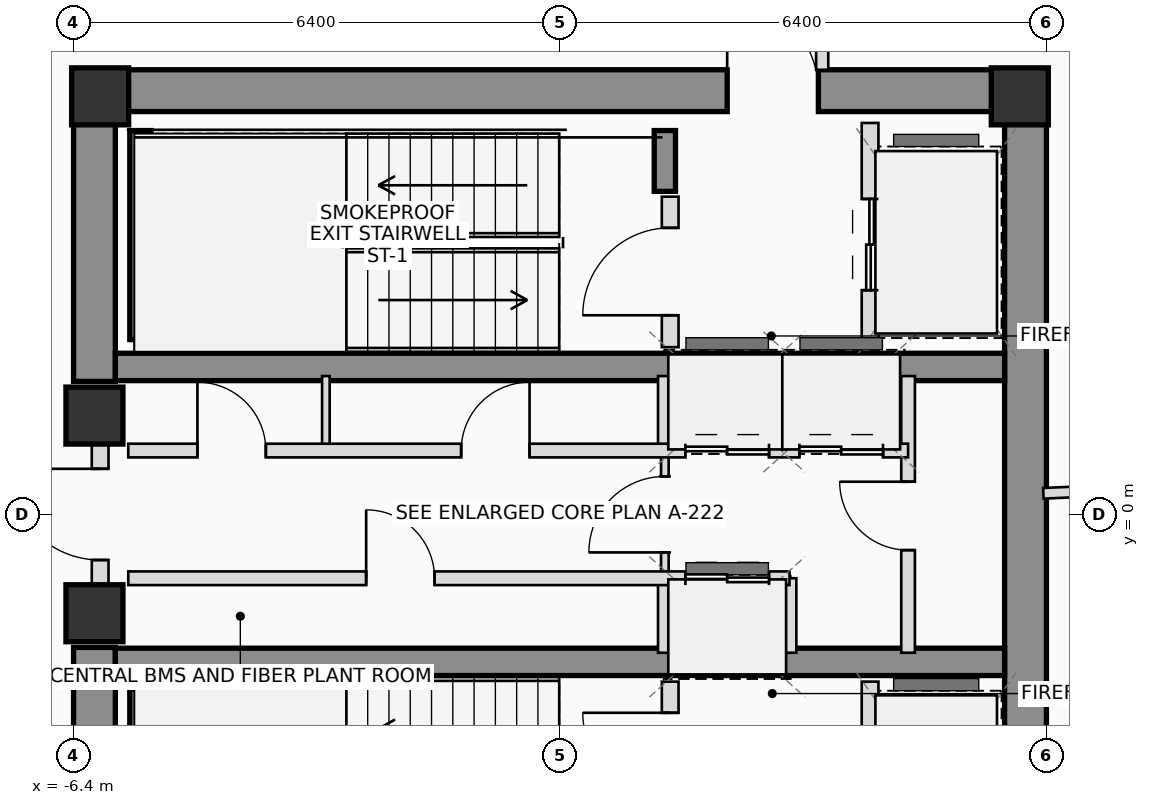
"""IFC4 building model, lengths in metres.
Left out: names, types, materials, properties, quantities, classifications, styles, units other than length and angle.
Written with IfcOpenShell. Run it as: python <this file> out.ifc"""

import sys

from ifc_helpers import new_model, si_unit, direction, frame, frame_2d, origin, origin_2d, place, context, subcontext, project, spatial, rectangle, extrude, source, transform, mapped, element, fill, save


model = new_model("IFC4")
c1 = context("Model", 3, precision=1e-05, world=origin(), true_north=direction((0.0, 1.0)))
c2 = subcontext(c1, "Body", "Model", "MODEL_VIEW")
j1 = project(units=[si_unit("LENGTHUNIT", "METRE"), si_unit("PLANEANGLEUNIT", "RADIAN")], contexts=[c1])
p1 = place(None, origin())
s1 = spatial("IfcSite", under=j1, at=p1, CompositionType="ELEMENT")
p2 = place(p1, origin())
s2 = spatial("IfcBuilding", under=s1, at=p2, CompositionType="ELEMENT")
p3 = place(p2, frame((0.0, 0.0, 238.85)))
s3 = spatial("IfcBuildingStorey", under=s2, at=p3, CompositionType="ELEMENT", Elevation=238.85)
m1 = source(origin(), c2, "Body", "SweptSolid", [
    extrude(rectangle(XDim=0.75, YDim=0.75, at=origin_2d()), origin(), (0.0, 0.0, 1.0), 3.4),
])
for number, where, z_axis, x_axis in (
    (1, (6.05, 5.5, 0.0), (0.0, 0.0, 1.0), (1.0, 0.0, 0.0)),
    (2, (-6.05, 5.5, 0.0), (0.0, 0.0, 1.0), (1.0, 0.0, 0.0)),
):
    element("IfcColumn", number, at=place(p3, frame(where, z_axis=z_axis, x_axis=x_axis)), inside=s3, PredefinedType="COLUMN", context=c2, shape_type="MappedRepresentation", body=[
        mapped(m1, transform((0.0, 0.0, 0.0), scale=1.0)),
    ])
p4 = place(p3, frame((-6.4, 5.575, 0.0), z_axis=(0.0, 0.0, 1.0), x_axis=(1.0, 0.0, 0.0)))
e3 = element("IfcWall", 3, at=p4, inside=s3, PredefinedType="SHEAR", context=c2, shape_type="SweptSolid", body=[
    extrude(rectangle(XDim=12.8, YDim=0.55, at=frame_2d((6.4, 0.0))), origin(), (0.0, 0.0, 1.0), 3.4),
])
p5 = place(p4, frame((8.6, 0.0, 0.0)))
e4 = element("IfcOpeningElement", 4, at=p5, cuts=e3, PredefinedType="OPENING", context=c2, shape_type="SweptSolid", body=[
    extrude(rectangle(XDim=1.2, YDim=2.2, at=frame_2d((0.6, 1.1))), frame((0.0, 0.285, 0.0), z_axis=(0.0, -1.0, 0.0), x_axis=(1.0, 0.0, 0.0)), (0.0, 0.0, 1.0), 0.57),
])
p6 = place(p3, frame((6.125, -5.3, 0.0), z_axis=(0.0, 0.0, 1.0), x_axis=(0.0, 1.0, 0.0)))
e5 = element("IfcWall", 5, at=p6, inside=s3, PredefinedType="SHEAR", context=c2, shape_type="SweptSolid", body=[
    extrude(rectangle(XDim=10.6, YDim=0.55, at=frame_2d((5.3, 0.0))), origin(), (0.0, 0.0, 1.0), 3.4),
])
for number, where, z_axis, x_axis in (
    (6, (-6.125, -5.3, 0.0), (0.0, 0.0, 1.0), (0.0, 1.0, 0.0)),
    (7, (-6.125, 1.75, 0.0), (0.0, 0.0, 1.0), (0.0, 1.0, 0.0)),
):
    element("IfcWall", number, at=place(p3, frame(where, z_axis=z_axis, x_axis=x_axis)), inside=s3, PredefinedType="SHEAR", context=c2, shape_type="SweptSolid", body=[
        extrude(rectangle(XDim=3.55, YDim=0.55, at=frame_2d((1.775, 0.0))), origin(), (0.0, 0.0, 1.0), 3.4),
    ])
for number, where, z_axis, x_axis in (
    (8, (-5.85, 1.94, 0.0), (0.0, 0.0, 1.0), (1.0, 0.0, 0.0)),
    (9, (-5.85, -1.94, 0.0), (0.0, 0.0, 1.0), (1.0, 0.0, 0.0)),
):
    element("IfcWall", number, at=place(p3, frame(where, z_axis=z_axis, x_axis=x_axis)), inside=s3, PredefinedType="SHEAR", context=c2, shape_type="SweptSolid", body=[
        extrude(rectangle(XDim=11.7, YDim=0.36, at=frame_2d((5.85, 0.0))), origin(), (0.0, 0.0, 1.0), 3.4),
    ])
p7 = place(p3, frame((-5.52, 2.3, 0.0), z_axis=(0.0, 0.0, 1.0), x_axis=(0.0, 1.0, 0.0)))
e10 = element("IfcWall", 10, at=p7, inside=s3, PredefinedType="SHEAR", context=c2, shape_type="SweptSolid", body=[
    extrude(rectangle(XDim=2.75, YDim=0.28, at=frame_2d((1.375, 0.0))), origin(), (0.0, 0.0, 1.0), 3.4),
])
p8 = place(p3, frame((1.38, 4.25, 0.0), z_axis=(0.0, 0.0, 1.0), x_axis=(0.0, 1.0, 0.0)))
e11 = element("IfcWall", 11, at=p8, inside=s3, PredefinedType="SHEAR", context=c2, shape_type="SweptSolid", body=[
    extrude(rectangle(XDim=0.8, YDim=0.28, at=frame_2d((0.4, 0.0))), origin(), (0.0, 0.0, 1.0), 3.4),
])
p9 = place(p3, frame((-5.52, -5.05, 0.0), z_axis=(0.0, 0.0, 1.0), x_axis=(0.0, 1.0, 0.0)))
e12 = element("IfcWall", 12, at=p9, inside=s3, PredefinedType="SHEAR", context=c2, shape_type="SweptSolid", body=[
    extrude(rectangle(XDim=2.75, YDim=0.28, at=frame_2d((1.375, 0.0))), origin(), (0.0, 0.0, 1.0), 3.4),
])
for number, where, z_axis, x_axis in (
    (13, (-6.125, -1.3, 0.0), (0.0, 0.0, 1.0), (1.0, 0.0, 0.0)),
    (14, (-6.125, 1.3, 0.0), (0.0, 0.0, 1.0), (1.0, 0.0, 0.0)),
):
    element("IfcColumn", number, at=place(p3, frame(where, z_axis=z_axis, x_axis=x_axis)), inside=s3, PredefinedType="COLUMN", context=c2, shape_type="MappedRepresentation", body=[
        mapped(m1, transform((0.0, 0.0, 0.0), scale=1.0)),
    ])
p10 = place(p3, frame((-6.05, -0.95, 0.0), z_axis=(0.0, 0.0, 1.0), x_axis=(0.0, 1.0, 0.0)))
e15 = element("IfcWall", 15, at=p10, inside=s3, PredefinedType="PLUMBINGWALL", context=c2, shape_type="SweptSolid", body=[
    extrude(rectangle(XDim=1.9, YDim=0.22, at=frame_2d((0.95, 0.0))), origin(), (0.0, 0.0, 1.0), 2.18),
])
p11 = place(p10, frame((0.35, 0.0, 0.0)))
e16 = element("IfcOpeningElement", 16, at=p11, cuts=e15, PredefinedType="OPENING", context=c2, shape_type="SweptSolid", body=[
    extrude(rectangle(XDim=1.2, YDim=2.2, at=frame_2d((0.6, 1.1))), frame((0.0, 0.12, 0.0), z_axis=(0.0, -1.0, 0.0), x_axis=(1.0, 0.0, 0.0)), (0.0, 0.0, 1.0), 0.24),
])
p12 = place(p3, frame((1.45, 2.2, 0.0), z_axis=(0.0, 0.0, 1.0), x_axis=(0.0, 1.0, 0.0)))
e17 = element("IfcWall", 17, at=p12, inside=s3, PredefinedType="PLUMBINGWALL", context=c2, shape_type="SweptSolid", body=[
    extrude(rectangle(XDim=1.98, YDim=0.22, at=frame_2d((0.99, 0.0))), origin(), (0.0, 0.0, 1.0), 3.2),
])
p13 = place(p12, frame((0.42, 0.0, 0.0)))
e18 = element("IfcOpeningElement", 18, at=p13, cuts=e17, PredefinedType="OPENING", context=c2, shape_type="SweptSolid", body=[
    extrude(rectangle(XDim=1.15, YDim=2.15, at=frame_2d((0.575, 1.075))), frame((0.0, 0.12, 0.0), z_axis=(0.0, -1.0, 0.0), x_axis=(1.0, 0.0, 0.0)), (0.0, 0.0, 1.0), 0.24),
])
p14 = place(p3, frame((4.08, 2.2, 0.0), z_axis=(0.0, 0.0, 1.0), x_axis=(0.0, 1.0, 0.0)))
e19 = element("IfcWall", 19, at=p14, inside=s3, PredefinedType="PLUMBINGWALL", context=c2, shape_type="SweptSolid", body=[
    extrude(rectangle(XDim=2.95, YDim=0.22, at=frame_2d((1.475, 0.0))), origin(), (0.0, 0.0, 1.0), 3.2),
])
p15 = place(p14, frame((0.75, 0.0, 0.0)))
e20 = element("IfcOpeningElement", 20, at=p15, cuts=e19, PredefinedType="OPENING", context=c2, shape_type="SweptSolid", body=[
    extrude(rectangle(XDim=1.2, YDim=2.25, at=frame_2d((0.6, 1.125))), frame((0.0, 0.12, 0.0), z_axis=(0.0, -1.0, 0.0), x_axis=(1.0, 0.0, 0.0)), (0.0, 0.0, 1.0), 0.24),
])
p16 = place(p3, frame((1.45, -4.18, 0.0), z_axis=(0.0, 0.0, 1.0), x_axis=(0.0, 1.0, 0.0)))
e21 = element("IfcWall", 21, at=p16, inside=s3, PredefinedType="PLUMBINGWALL", context=c2, shape_type="SweptSolid", body=[
    extrude(rectangle(XDim=1.98, YDim=0.22, at=frame_2d((0.99, 0.0))), origin(), (0.0, 0.0, 1.0), 3.2),
])
p17 = place(p16, frame((0.42, 0.0, 0.0)))
e22 = element("IfcOpeningElement", 22, at=p17, cuts=e21, PredefinedType="OPENING", context=c2, shape_type="SweptSolid", body=[
    extrude(rectangle(XDim=1.15, YDim=2.15, at=frame_2d((0.575, 1.075))), frame((0.0, 0.12, 0.0), z_axis=(0.0, -1.0, 0.0), x_axis=(1.0, 0.0, 0.0)), (0.0, 0.0, 1.0), 0.24),
])
p18 = place(p3, frame((4.08, -5.15, 0.0), z_axis=(0.0, 0.0, 1.0), x_axis=(0.0, 1.0, 0.0)))
e23 = element("IfcWall", 23, at=p18, inside=s3, PredefinedType="PLUMBINGWALL", context=c2, shape_type="SweptSolid", body=[
    extrude(rectangle(XDim=2.95, YDim=0.22, at=frame_2d((1.475, 0.0))), origin(), (0.0, 0.0, 1.0), 3.2),
])
p19 = place(p18, frame((0.95, 0.0, 0.0)))
e24 = element("IfcOpeningElement", 24, at=p19, cuts=e23, PredefinedType="OPENING", context=c2, shape_type="SweptSolid", body=[
    extrude(rectangle(XDim=1.2, YDim=2.25, at=frame_2d((0.6, 1.125))), frame((0.0, 0.12, 0.0), z_axis=(0.0, -1.0, 0.0), x_axis=(1.0, 0.0, 0.0)), (0.0, 0.0, 1.0), 0.24),
])
p20 = place(p3, frame((1.38, -0.84, 0.0), z_axis=(0.0, 0.0, 1.0), x_axis=(0.0, 1.0, 0.0)))
e25 = element("IfcWall", 25, at=p20, inside=s3, PredefinedType="PARTITIONING", context=c2, shape_type="SweptSolid", body=[
    extrude(rectangle(XDim=1.68, YDim=0.1, at=frame_2d((0.84, 0.0))), origin(), (0.0, 0.0, 1.0), 3.2),
])
p21 = place(p20, frame((0.34, 0.0, 0.0)))
e26 = element("IfcOpeningElement", 26, at=p21, cuts=e25, PredefinedType="OPENING", context=c2, shape_type="SweptSolid", body=[
    extrude(rectangle(XDim=1.0, YDim=2.25, at=frame_2d((0.5, 1.125))), frame((0.0, 0.06, 0.0), z_axis=(0.0, -1.0, 0.0), x_axis=(1.0, 0.0, 0.0)), (0.0, 0.0, 1.0), 0.12),
])
p22 = place(p3, frame((-3.08, 0.84, 0.0), z_axis=(0.0, 0.0, 1.0), x_axis=(0.0, 1.0, 0.0)))
e27 = element("IfcWall", 27, at=p22, inside=s3, PredefinedType="PARTITIONING", context=c2, shape_type="SweptSolid", body=[
    extrude(rectangle(XDim=0.98, YDim=0.1, at=frame_2d((0.49, 0.0))), origin(), (0.0, 0.0, 1.0), 3.2),
])
for number, where, z_axis, x_axis in (
    (28, (1.38, 0.84, 0.0), (0.0, 0.0, 1.0), (0.0, 1.0, 0.0)),
    (29, (1.38, -1.82, 0.0), (0.0, 0.0, 1.0), (0.0, 1.0, 0.0)),
    (30, (3.02, 0.84, 0.0), (0.0, 0.0, 1.0), (0.0, 1.0, 0.0)),
    (31, (4.38, 0.84, 0.0), (0.0, 0.0, 1.0), (0.0, 1.0, 0.0)),
    (32, (3.02, -1.82, 0.0), (0.0, 0.0, 1.0), (0.0, 1.0, 0.0)),
):
    element("IfcWall", number, at=place(p3, frame(where, z_axis=z_axis, x_axis=x_axis)), inside=s3, PredefinedType="PLUMBINGWALL", context=c2, shape_type="SweptSolid", body=[
        extrude(rectangle(XDim=0.98, YDim=0.18, at=frame_2d((0.49, 0.0))), origin(), (0.0, 0.0, 1.0), 3.2),
    ])
p23 = place(p3, frame((4.58, -1.82, 0.0), z_axis=(0.0, 0.0, 1.0), x_axis=(0.0, 1.0, 0.0)))
e33 = element("IfcWall", 33, at=p23, inside=s3, PredefinedType="PLUMBINGWALL", context=c2, shape_type="SweptSolid", body=[
    extrude(rectangle(XDim=3.64, YDim=0.18, at=frame_2d((1.82, 0.0))), origin(), (0.0, 0.0, 1.0), 3.2),
])
p24 = place(p23, frame((1.35, 0.0, 0.0)))
e34 = element("IfcOpeningElement", 34, at=p24, cuts=e33, PredefinedType="OPENING", context=c2, shape_type="SweptSolid", body=[
    extrude(rectangle(XDim=0.9, YDim=2.05, at=frame_2d((0.45, 1.025))), frame((0.0, 0.1, 0.0), z_axis=(0.0, -1.0, 0.0), x_axis=(1.0, 0.0, 0.0)), (0.0, 0.0, 1.0), 0.2),
])
p25 = place(p3, frame((-5.68, 0.84, 0.0), z_axis=(0.0, 0.0, 1.0), x_axis=(1.0, 0.0, 0.0)))
e35 = element("IfcWall", 35, at=p25, inside=s3, PredefinedType="PLUMBINGWALL", context=c2, shape_type="SweptSolid", body=[
    extrude(rectangle(XDim=10.26, YDim=0.18, at=frame_2d((5.13, 0.0))), origin(), (0.0, 0.0, 1.0), 3.2),
])
p26 = place(p25, frame((0.91, 0.0, 0.0)))
e36 = element("IfcOpeningElement", 36, at=p26, cuts=e35, PredefinedType="OPENING", context=c2, shape_type="SweptSolid", body=[
    extrude(rectangle(XDim=0.9, YDim=2.05, at=frame_2d((0.45, 1.025))), frame((0.0, 0.1, 0.0), z_axis=(0.0, -1.0, 0.0), x_axis=(1.0, 0.0, 0.0)), (0.0, 0.0, 1.0), 0.2),
])
p27 = place(p25, frame((4.38, 0.0, 0.0)))
e37 = element("IfcOpeningElement", 37, at=p27, cuts=e35, PredefinedType="OPENING", context=c2, shape_type="SweptSolid", body=[
    extrude(rectangle(XDim=0.9, YDim=2.05, at=frame_2d((0.45, 1.025))), frame((0.0, 0.1, 0.0), z_axis=(0.0, -1.0, 0.0), x_axis=(1.0, 0.0, 0.0)), (0.0, 0.0, 1.0), 0.2),
])
p28 = place(p25, frame((7.33, 0.0, 0.0)))
e38 = element("IfcOpeningElement", 38, at=p28, cuts=e35, PredefinedType="OPENING", context=c2, shape_type="SweptSolid", body=[
    extrude(rectangle(XDim=1.1, YDim=2.2, at=frame_2d((0.55, 1.1))), frame((0.0, 0.1, 0.0), z_axis=(0.0, -1.0, 0.0), x_axis=(1.0, 0.0, 0.0)), (0.0, 0.0, 1.0), 0.2),
])
p29 = place(p25, frame((8.83, 0.0, 0.0)))
e39 = element("IfcOpeningElement", 39, at=p29, cuts=e35, PredefinedType="OPENING", context=c2, shape_type="SweptSolid", body=[
    extrude(rectangle(XDim=1.1, YDim=2.2, at=frame_2d((0.55, 1.1))), frame((0.0, 0.1, 0.0), z_axis=(0.0, -1.0, 0.0), x_axis=(1.0, 0.0, 0.0)), (0.0, 0.0, 1.0), 0.2),
])
p30 = place(p3, frame((-5.68, -0.84, 0.0), z_axis=(0.0, 0.0, 1.0), x_axis=(1.0, 0.0, 0.0)))
e40 = element("IfcWall", 40, at=p30, inside=s3, PredefinedType="PLUMBINGWALL", context=c2, shape_type="SweptSolid", body=[
    extrude(rectangle(XDim=8.7, YDim=0.18, at=frame_2d((4.35, 0.0))), origin(), (0.0, 0.0, 1.0), 3.2),
])
p31 = place(p30, frame((3.13, 0.0, 0.0)))
e41 = element("IfcOpeningElement", 41, at=p31, cuts=e40, PredefinedType="OPENING", context=c2, shape_type="SweptSolid", body=[
    extrude(rectangle(XDim=0.9, YDim=2.05, at=frame_2d((0.45, 1.025))), frame((0.0, 0.1, 0.0), z_axis=(0.0, -1.0, 0.0), x_axis=(1.0, 0.0, 0.0)), (0.0, 0.0, 1.0), 0.2),
])
p32 = place(p30, frame((7.33, 0.0, 0.0)))
e42 = element("IfcOpeningElement", 42, at=p32, cuts=e40, PredefinedType="OPENING", context=c2, shape_type="SweptSolid", body=[
    extrude(rectangle(XDim=1.1, YDim=2.2, at=frame_2d((0.55, 1.1))), frame((0.0, 0.1, 0.0), z_axis=(0.0, -1.0, 0.0), x_axis=(1.0, 0.0, 0.0)), (0.0, 0.0, 1.0), 0.2),
])
p33 = place(p3, frame((3.45, 7.49, 0.0), z_axis=(0.0, 0.0, 1.0), x_axis=(0.0, -1.0, 0.0)))
e43 = element("IfcWall", 43, at=p33, inside=s3, PredefinedType="PARTITIONING", context=c2, shape_type="SweptSolid", body=[
    extrude(rectangle(XDim=1.64, YDim=0.16, at=frame_2d((0.82, 0.0))), origin(), (0.0, 0.0, 1.0), 3.2),
])
p34 = place(p3, frame((6.36, 0.278, 0.0), z_axis=(0.0, 0.0, 1.0), x_axis=(0.999048037217, 0.043623609819, 0.0)))
e44 = element("IfcWall", 44, at=p34, inside=s3, PredefinedType="PARTITIONING", context=c2, shape_type="SweptSolid", body=[
    extrude(rectangle(XDim=2.899, YDim=0.14, at=frame_2d((1.449, 0.0))), origin(), (0.0, 0.0, 1.0), 3.2),
])
p35 = place(p5, origin())
e45 = element("IfcDoor", 45, at=p35, inside=s3, OperationType="SINGLE_SWING_LEFT", PredefinedType="DOOR", context=c2, shape_type="SweptSolid", body=[
    extrude(rectangle(XDim=1.2, YDim=2.2, at=frame_2d((0.6, 1.1))), frame((0.0, 0.025, 0.0), z_axis=(0.0, -1.0, 0.0), x_axis=(1.0, 0.0, 0.0)), (0.0, 0.0, 1.0), 0.05),
])
fill(e4, e45)
p36 = place(p11, origin())
e46 = element("IfcDoor", 46, at=p36, inside=s3, OperationType="SINGLE_SWING_RIGHT", PredefinedType="DOOR", context=c2, shape_type="SweptSolid", body=[
    extrude(rectangle(XDim=1.2, YDim=2.2, at=frame_2d((0.6, 1.1))), frame((0.0, 0.025, 0.0), z_axis=(0.0, -1.0, 0.0), x_axis=(1.0, 0.0, 0.0)), (0.0, 0.0, 1.0), 0.05),
])
fill(e16, e46)
p37 = place(p13, origin())
e47 = element("IfcDoor", 47, at=p37, inside=s3, OperationType="SINGLE_SWING_LEFT", PredefinedType="DOOR", context=c2, shape_type="SweptSolid", body=[
    extrude(rectangle(XDim=1.15, YDim=2.15, at=frame_2d((0.575, 1.075))), frame((0.0, 0.025, 0.0), z_axis=(0.0, -1.0, 0.0), x_axis=(1.0, 0.0, 0.0)), (0.0, 0.0, 1.0), 0.05),
])
fill(e18, e47)
p38 = place(p15, origin())
e48 = element("IfcDoor", 48, at=p38, inside=s3, OperationType="DOUBLE_DOOR_SLIDING", PredefinedType="DOOR", context=c2, shape_type="SweptSolid", body=[
    extrude(rectangle(XDim=1.2, YDim=2.25, at=frame_2d((0.6, 1.125))), frame((0.0, 0.025, 0.0), z_axis=(0.0, -1.0, 0.0), x_axis=(1.0, 0.0, 0.0)), (0.0, 0.0, 1.0), 0.05),
])
fill(e20, e48)
p39 = place(p17, origin())
e49 = element("IfcDoor", 49, at=p39, inside=s3, OperationType="SINGLE_SWING_RIGHT", PredefinedType="DOOR", context=c2, shape_type="SweptSolid", body=[
    extrude(rectangle(XDim=1.15, YDim=2.15, at=frame_2d((0.575, 1.075))), frame((0.0, 0.025, 0.0), z_axis=(0.0, -1.0, 0.0), x_axis=(1.0, 0.0, 0.0)), (0.0, 0.0, 1.0), 0.05),
])
fill(e22, e49)
p40 = place(p21, origin())
e50 = element("IfcDoor", 50, at=p40, inside=s3, OperationType="SINGLE_SWING_LEFT", PredefinedType="DOOR", context=c2, shape_type="SweptSolid", body=[
    extrude(rectangle(XDim=1.0, YDim=2.25, at=frame_2d((0.5, 1.125))), frame((0.0, 0.025, 0.0), z_axis=(0.0, -1.0, 0.0), x_axis=(1.0, 0.0, 0.0)), (0.0, 0.0, 1.0), 0.05),
])
fill(e26, e50)
p41 = place(p24, origin())
e51 = element("IfcDoor", 51, at=p41, inside=s3, OperationType="SINGLE_SWING_RIGHT", PredefinedType="DOOR", context=c2, shape_type="SweptSolid", body=[
    extrude(rectangle(XDim=0.9, YDim=2.05, at=frame_2d((0.45, 1.025))), frame((0.0, 0.025, 0.0), z_axis=(0.0, -1.0, 0.0), x_axis=(1.0, 0.0, 0.0)), (0.0, 0.0, 1.0), 0.05),
])
fill(e34, e51)
p42 = place(p26, origin())
e52 = element("IfcDoor", 52, at=p42, inside=s3, OperationType="SINGLE_SWING_LEFT", PredefinedType="DOOR", context=c2, shape_type="SweptSolid", body=[
    extrude(rectangle(XDim=0.9, YDim=2.05, at=frame_2d((0.45, 1.025))), frame((0.0, 0.025, 0.0), z_axis=(0.0, -1.0, 0.0), x_axis=(1.0, 0.0, 0.0)), (0.0, 0.0, 1.0), 0.05),
])
fill(e36, e52)
p43 = place(p27, origin())
e53 = element("IfcDoor", 53, at=p43, inside=s3, OperationType="SINGLE_SWING_RIGHT", PredefinedType="DOOR", context=c2, shape_type="SweptSolid", body=[
    extrude(rectangle(XDim=0.9, YDim=2.05, at=frame_2d((0.45, 1.025))), frame((0.0, 0.025, 0.0), z_axis=(0.0, -1.0, 0.0), x_axis=(1.0, 0.0, 0.0)), (0.0, 0.0, 1.0), 0.05),
])
fill(e37, e53)
p44 = place(p28, origin())
e54 = element("IfcDoor", 54, at=p44, inside=s3, OperationType="DOUBLE_DOOR_SLIDING", PredefinedType="DOOR", context=c2, shape_type="SweptSolid", body=[
    extrude(rectangle(XDim=1.1, YDim=2.2, at=frame_2d((0.55, 1.1))), frame((0.0, 0.025, 0.0), z_axis=(0.0, -1.0, 0.0), x_axis=(1.0, 0.0, 0.0)), (0.0, 0.0, 1.0), 0.05),
])
fill(e38, e54)
p45 = place(p29, origin())
e55 = element("IfcDoor", 55, at=p45, inside=s3, OperationType="DOUBLE_DOOR_SLIDING", PredefinedType="DOOR", context=c2, shape_type="SweptSolid", body=[
    extrude(rectangle(XDim=1.1, YDim=2.2, at=frame_2d((0.55, 1.1))), frame((0.0, 0.025, 0.0), z_axis=(0.0, -1.0, 0.0), x_axis=(1.0, 0.0, 0.0)), (0.0, 0.0, 1.0), 0.05),
])
fill(e39, e55)
p46 = place(p31, origin())
e56 = element("IfcDoor", 56, at=p46, inside=s3, OperationType="SINGLE_SWING_LEFT", PredefinedType="DOOR", context=c2, shape_type="SweptSolid", body=[
    extrude(rectangle(XDim=0.9, YDim=2.05, at=frame_2d((0.45, 1.025))), frame((0.0, 0.025, 0.0), z_axis=(0.0, -1.0, 0.0), x_axis=(1.0, 0.0, 0.0)), (0.0, 0.0, 1.0), 0.05),
])
fill(e41, e56)
p47 = place(p32, origin())
e57 = element("IfcDoor", 57, at=p47, inside=s3, OperationType="DOUBLE_DOOR_SLIDING", PredefinedType="DOOR", context=c2, shape_type="SweptSolid", body=[
    extrude(rectangle(XDim=1.1, YDim=2.2, at=frame_2d((0.55, 1.1))), frame((0.0, 0.025, 0.0), z_axis=(0.0, -1.0, 0.0), x_axis=(1.0, 0.0, 0.0)), (0.0, 0.0, 1.0), 0.05),
])
fill(e42, e57)
save(model, sys.argv[1])
